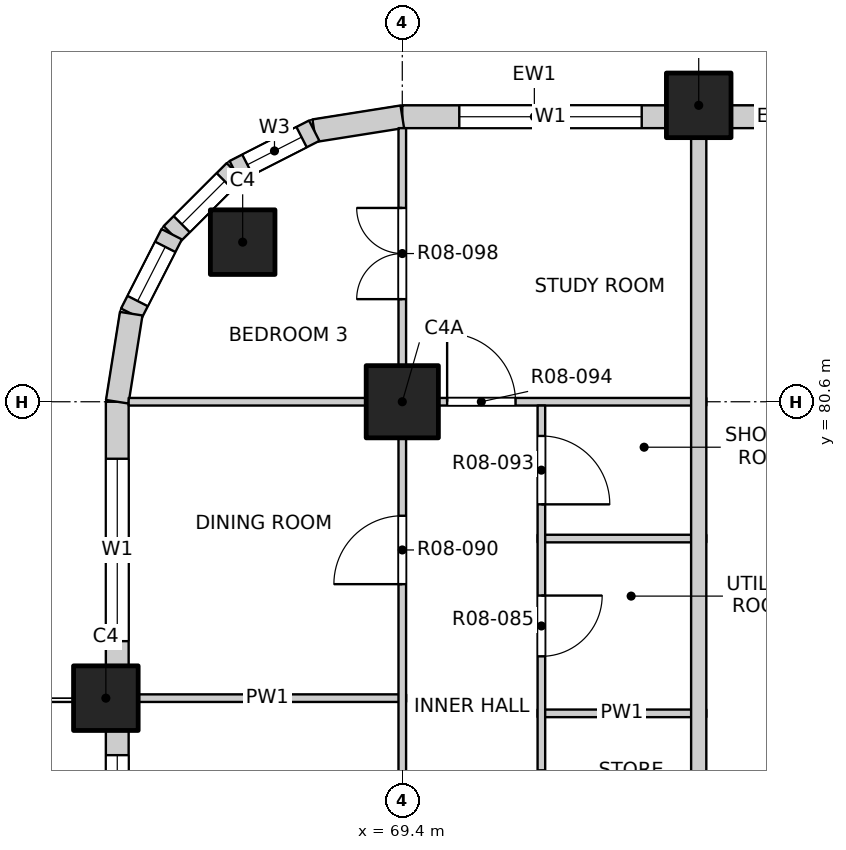
"""IFC4 building model, lengths in metres.
Left out: names, types, materials, properties, quantities, classifications, styles, units other than length and angle.
Written with IfcOpenShell. Run it as: python <this file> out.ifc"""

import sys

from ifc_helpers import new_model, si_unit, direction, frame, frame_2d, origin, origin_2d, place, context, subcontext, project, spatial, rectangle, extrude, element, fill, save


model = new_model("IFC4")
c1 = context("Model", 3, precision=1e-05, world=origin(), true_north=direction((0.0, 1.0)))
c2 = subcontext(c1, "Body", "Model", "MODEL_VIEW")
j1 = project(units=[si_unit("LENGTHUNIT", "METRE"), si_unit("PLANEANGLEUNIT", "RADIAN")], contexts=[c1])
p1 = place(None, origin())
s1 = spatial("IfcSite", under=j1, at=p1, CompositionType="ELEMENT")
p2 = place(p1, origin())
s2 = spatial("IfcBuilding", under=s1, at=p2, CompositionType="ELEMENT")
p3 = place(p2, frame((0.0, 0.0, 103.3)))
s3 = spatial("IfcBuildingStorey", under=s2, at=p3, CompositionType="ELEMENT", Elevation=103.3)
for number, where, z_axis, x_axis in (
    (1, (67.3, 82.7, -0.25), (0.0, 0.0, 1.0), (1.0, 0.0, 0.0)),
    (2, (73.3, 84.5, -0.25), (0.0, 0.0, 1.0), (1.0, 0.0, 0.0)),
    (3, (65.5, 76.7, -0.25), (0.0, 0.0, 1.0), (1.0, 0.0, 0.0)),
):
    element("IfcColumn", number, at=place(p3, frame(where, z_axis=z_axis, x_axis=x_axis)), inside=s3, PredefinedType="COLUMN", context=c2, shape_type="SweptSolid", body=[
        extrude(rectangle(XDim=0.85, YDim=0.85, at=origin_2d()), origin(), (0.0, 0.0, 1.0), 3.4),
    ])
p4 = place(p3, frame((69.4, 80.6, -0.25), z_axis=(0.0, 0.0, 1.0), x_axis=(1.0, 0.0, 0.0)))
e4 = element("IfcColumn", 4, at=p4, inside=s3, PredefinedType="COLUMN", context=c2, shape_type="SweptSolid", body=[
    extrude(rectangle(XDim=0.95, YDim=0.95, at=origin_2d()), origin(), (0.0, 0.0, 1.0), 3.4),
])
p5 = place(p3, frame((69.4, 84.35, 0.0), z_axis=(0.0, 0.0, 1.0), x_axis=(1.0, 0.0, 0.0)))
e5 = element("IfcWall", 5, at=p5, inside=s3, PredefinedType="SOLIDWALL", context=c2, shape_type="SweptSolid", body=[
    extrude(rectangle(XDim=3.475, YDim=0.3, at=frame_2d((1.738, 0.0))), origin(), (0.0, 0.0, 1.0), 2.7),
])
p6 = place(p5, frame((0.75, 0.0, 0.9)))
e6 = element("IfcOpeningElement", 6, at=p6, cuts=e5, PredefinedType="OPENING", context=c2, shape_type="SweptSolid", body=[
    extrude(rectangle(XDim=2.4, YDim=1.8, at=frame_2d((1.2, 0.9))), frame((0.0, 0.16, 0.0), z_axis=(0.0, -1.0, 0.0), x_axis=(1.0, 0.0, 0.0)), (0.0, 0.0, 1.0), 0.32),
])
p7 = place(p3, frame((73.725, 84.35, 0.0), z_axis=(0.0, 0.0, 1.0), x_axis=(1.0, 0.0, 0.0)))
e7 = element("IfcWall", 7, at=p7, inside=s3, PredefinedType="SOLIDWALL", context=c2, shape_type="SweptSolid", body=[
    extrude(rectangle(XDim=1.25, YDim=0.3, at=frame_2d((0.625, 0.0))), origin(), (0.0, 0.0, 1.0), 2.7),
])
p8 = place(p3, frame((65.65, 69.325, 0.0), z_axis=(0.0, 0.0, 1.0), x_axis=(0.0, 1.0, 0.0)))
e8 = element("IfcWall", 8, at=p8, inside=s3, PredefinedType="SOLIDWALL", context=c2, shape_type="SweptSolid", body=[
    extrude(rectangle(XDim=6.95, YDim=0.3, at=frame_2d((3.475, 0.0))), origin(), (0.0, 0.0, 1.0), 2.7),
])
p9 = place(p8, frame((0.625, 0.0, 0.0)))
e9 = element("IfcOpeningElement", 9, at=p9, cuts=e8, PredefinedType="OPENING", context=c2, shape_type="SweptSolid", body=[
    extrude(rectangle(XDim=1.8, YDim=2.4, at=frame_2d((0.9, 1.2))), frame((0.0, 0.16, 0.0), z_axis=(0.0, -1.0, 0.0), x_axis=(1.0, 0.0, 0.0)), (0.0, 0.0, 1.0), 0.32),
])
p10 = place(p8, frame((4.225, 0.0, 0.9)))
e10 = element("IfcOpeningElement", 10, at=p10, cuts=e8, PredefinedType="OPENING", context=c2, shape_type="SweptSolid", body=[
    extrude(rectangle(XDim=2.4, YDim=1.8, at=frame_2d((1.2, 0.9))), frame((0.0, 0.16, 0.0), z_axis=(0.0, -1.0, 0.0), x_axis=(1.0, 0.0, 0.0)), (0.0, 0.0, 1.0), 0.32),
])
p11 = place(p3, frame((65.65, 77.125, 0.0), z_axis=(0.0, 0.0, 1.0), x_axis=(0.0, 1.0, 0.0)))
e11 = element("IfcWall", 11, at=p11, inside=s3, PredefinedType="SOLIDWALL", context=c2, shape_type="SweptSolid", body=[
    extrude(rectangle(XDim=3.475, YDim=0.3, at=frame_2d((1.738, 0.0))), origin(), (0.0, 0.0, 1.0), 2.7),
])
p12 = place(p11, frame((0.325, 0.0, 0.9)))
e12 = element("IfcOpeningElement", 12, at=p12, cuts=e11, PredefinedType="OPENING", context=c2, shape_type="SweptSolid", body=[
    extrude(rectangle(XDim=2.4, YDim=1.8, at=frame_2d((1.2, 0.9))), frame((0.0, 0.16, 0.0), z_axis=(0.0, -1.0, 0.0), x_axis=(1.0, 0.0, 0.0)), (0.0, 0.0, 1.0), 0.32),
])
p13 = place(p3, frame((69.4, 84.35, 0.0), z_axis=(0.0, 0.0, 1.0), x_axis=(-0.987678452879, -0.156496880861, 0.0)))
e13 = element("IfcWall", 13, at=p13, inside=s3, PredefinedType="SOLIDWALL", context=c2, shape_type="SweptSolid", body=[
    extrude(rectangle(XDim=1.173, YDim=0.3, at=frame_2d((0.586, 0.0))), origin(), (0.0, 0.0, 1.0), 2.7),
])
p14 = place(p3, frame((68.241, 84.167, 0.0), z_axis=(0.0, 0.0, 1.0), x_axis=(-0.890988677504, -0.454025524128, 0.0)))
e14 = element("IfcWall", 14, at=p14, inside=s3, PredefinedType="SOLIDWALL", context=c2, shape_type="SweptSolid", body=[
    extrude(rectangle(XDim=1.173, YDim=0.3, at=frame_2d((0.587, 0.0))), origin(), (0.0, 0.0, 1.0), 2.7),
])
p15 = place(p14, frame((0.187, 0.0, 0.9)))
e15 = element("IfcOpeningElement", 15, at=p15, cuts=e14, PredefinedType="OPENING", context=c2, shape_type="SweptSolid", body=[
    extrude(rectangle(XDim=0.8, YDim=1.2, at=frame_2d((0.4, 0.6))), frame((0.0, 0.16, 0.0), z_axis=(0.0, -1.0, 0.0), x_axis=(1.0, 0.0, 0.0)), (0.0, 0.0, 1.0), 0.32),
])
p16 = place(p3, frame((67.196, 83.634, 0.0), z_axis=(0.0, 0.0, 1.0), x_axis=(-0.707106781187, -0.707106781187, 0.0)))
e16 = element("IfcWall", 16, at=p16, inside=s3, PredefinedType="SOLIDWALL", context=c2, shape_type="SweptSolid", body=[
    extrude(rectangle(XDim=1.173, YDim=0.3, at=frame_2d((0.586, 0.0))), origin(), (0.0, 0.0, 1.0), 2.7),
])
p17 = place(p16, frame((0.187, 0.0, 0.9)))
e17 = element("IfcOpeningElement", 17, at=p17, cuts=e16, PredefinedType="OPENING", context=c2, shape_type="SweptSolid", body=[
    extrude(rectangle(XDim=0.8, YDim=1.2, at=frame_2d((0.4, 0.6))), frame((0.0, 0.16, 0.0), z_axis=(0.0, -1.0, 0.0), x_axis=(1.0, 0.0, 0.0)), (0.0, 0.0, 1.0), 0.32),
])
p18 = place(p3, frame((66.366, 82.804, 0.0), z_axis=(0.0, 0.0, 1.0), x_axis=(-0.454025524128, -0.890988677504, 0.0)))
e18 = element("IfcWall", 18, at=p18, inside=s3, PredefinedType="SOLIDWALL", context=c2, shape_type="SweptSolid", body=[
    extrude(rectangle(XDim=1.173, YDim=0.3, at=frame_2d((0.587, 0.0))), origin(), (0.0, 0.0, 1.0), 2.7),
])
p19 = place(p18, frame((0.187, 0.0, 0.9)))
e19 = element("IfcOpeningElement", 19, at=p19, cuts=e18, PredefinedType="OPENING", context=c2, shape_type="SweptSolid", body=[
    extrude(rectangle(XDim=0.8, YDim=1.2, at=frame_2d((0.4, 0.6))), frame((0.0, 0.16, 0.0), z_axis=(0.0, -1.0, 0.0), x_axis=(1.0, 0.0, 0.0)), (0.0, 0.0, 1.0), 0.32),
])
p20 = place(p3, frame((65.833, 81.759, 0.0), z_axis=(0.0, 0.0, 1.0), x_axis=(-0.156496880861, -0.987678452879, 0.0)))
e20 = element("IfcWall", 20, at=p20, inside=s3, PredefinedType="SOLIDWALL", context=c2, shape_type="SweptSolid", body=[
    extrude(rectangle(XDim=1.173, YDim=0.3, at=frame_2d((0.586, 0.0))), origin(), (0.0, 0.0, 1.0), 2.7),
])
p21 = place(p3, frame((71.18, 76.5, 0.0), z_axis=(0.0, 0.0, 1.0), x_axis=(1.0, 0.0, 0.0)))
e21 = element("IfcWall", 21, at=p21, inside=s3, PredefinedType="PARTITIONING", context=c2, shape_type="SweptSolid", body=[
    extrude(rectangle(XDim=2.22, YDim=0.1, at=frame_2d((1.11, 0.0))), origin(), (0.0, 0.0, 1.0), 2.55),
])
p22 = place(p3, frame((65.8, 76.7, 0.0), z_axis=(0.0, 0.0, 1.0), x_axis=(1.0, 0.0, 0.0)))
e22 = element("IfcWall", 22, at=p22, inside=s3, PredefinedType="PARTITIONING", context=c2, shape_type="SweptSolid", body=[
    extrude(rectangle(XDim=3.65, YDim=0.1, at=frame_2d((1.825, 0.0))), origin(), (0.0, 0.0, 1.0), 2.55),
])
p23 = place(p3, frame((71.18, 78.8, 0.0), z_axis=(0.0, 0.0, 1.0), x_axis=(1.0, 0.0, 0.0)))
e23 = element("IfcWall", 23, at=p23, inside=s3, PredefinedType="PARTITIONING", context=c2, shape_type="SweptSolid", body=[
    extrude(rectangle(XDim=2.22, YDim=0.1, at=frame_2d((1.11, 0.0))), origin(), (0.0, 0.0, 1.0), 3.15),
])
p24 = place(p3, frame((65.8, 80.6, 0.0), z_axis=(0.0, 0.0, 1.0), x_axis=(1.0, 0.0, 0.0)))
e24 = element("IfcWall", 24, at=p24, inside=s3, PredefinedType="PARTITIONING", context=c2, shape_type="SweptSolid", body=[
    extrude(rectangle(XDim=7.6, YDim=0.1, at=frame_2d((3.8, 0.0))), origin(), (0.0, 0.0, 1.0), 3.15),
])
p25 = place(p24, frame((4.19, 0.0, 0.0)))
e25 = element("IfcOpeningElement", 25, at=p25, cuts=e24, PredefinedType="OPENING", context=c2, shape_type="SweptSolid", body=[
    extrude(rectangle(XDim=0.9, YDim=2.1, at=frame_2d((0.45, 1.05))), frame((0.0, 0.06, 0.0), z_axis=(0.0, -1.0, 0.0), x_axis=(1.0, 0.0, 0.0)), (0.0, 0.0, 1.0), 0.12),
])
p26 = place(p3, frame((69.4, 45.8, 0.0), z_axis=(0.0, 0.0, 1.0), x_axis=(0.0, 1.0, 0.0)))
e26 = element("IfcWall", 26, at=p26, inside=s3, PredefinedType="PARTITIONING", context=c2, shape_type="SweptSolid", body=[
    extrude(rectangle(XDim=38.4, YDim=0.1, at=frame_2d((19.2, 0.0))), origin(), (0.0, 0.0, 1.0), 3.15),
])
p27 = place(p26, frame((1.05, 0.0, 0.0)))
e27 = element("IfcOpeningElement", 27, at=p27, cuts=e26, PredefinedType="OPENING", context=c2, shape_type="SweptSolid", body=[
    extrude(rectangle(XDim=1.2, YDim=2.1, at=frame_2d((0.6, 1.05))), frame((0.0, 0.06, 0.0), z_axis=(0.0, -1.0, 0.0), x_axis=(1.0, 0.0, 0.0)), (0.0, 0.0, 1.0), 0.12),
])
p28 = place(p26, frame((5.1, 0.0, 0.0)))
e28 = element("IfcOpeningElement", 28, at=p28, cuts=e26, PredefinedType="OPENING", context=c2, shape_type="SweptSolid", body=[
    extrude(rectangle(XDim=0.9, YDim=2.1, at=frame_2d((0.45, 1.05))), frame((0.0, 0.06, 0.0), z_axis=(0.0, -1.0, 0.0), x_axis=(1.0, 0.0, 0.0)), (0.0, 0.0, 1.0), 0.12),
])
p29 = place(p26, frame((9.0, 0.0, 0.0)))
e29 = element("IfcOpeningElement", 29, at=p29, cuts=e26, PredefinedType="OPENING", context=c2, shape_type="SweptSolid", body=[
    extrude(rectangle(XDim=0.9, YDim=2.1, at=frame_2d((0.45, 1.05))), frame((0.0, 0.06, 0.0), z_axis=(0.0, -1.0, 0.0), x_axis=(1.0, 0.0, 0.0)), (0.0, 0.0, 1.0), 0.12),
])
p30 = place(p26, frame((12.9, 0.0, 0.0)))
e30 = element("IfcOpeningElement", 30, at=p30, cuts=e26, PredefinedType="OPENING", context=c2, shape_type="SweptSolid", body=[
    extrude(rectangle(XDim=0.9, YDim=2.1, at=frame_2d((0.45, 1.05))), frame((0.0, 0.06, 0.0), z_axis=(0.0, -1.0, 0.0), x_axis=(1.0, 0.0, 0.0)), (0.0, 0.0, 1.0), 0.12),
])
p31 = place(p26, frame((16.8, 0.0, 0.0)))
e31 = element("IfcOpeningElement", 31, at=p31, cuts=e26, PredefinedType="OPENING", context=c2, shape_type="SweptSolid", body=[
    extrude(rectangle(XDim=0.9, YDim=2.1, at=frame_2d((0.45, 1.05))), frame((0.0, 0.06, 0.0), z_axis=(0.0, -1.0, 0.0), x_axis=(1.0, 0.0, 0.0)), (0.0, 0.0, 1.0), 0.12),
])
p32 = place(p26, frame((20.7, 0.0, 0.0)))
e32 = element("IfcOpeningElement", 32, at=p32, cuts=e26, PredefinedType="OPENING", context=c2, shape_type="SweptSolid", body=[
    extrude(rectangle(XDim=0.9, YDim=2.1, at=frame_2d((0.45, 1.05))), frame((0.0, 0.06, 0.0), z_axis=(0.0, -1.0, 0.0), x_axis=(1.0, 0.0, 0.0)), (0.0, 0.0, 1.0), 0.12),
])
p33 = place(p26, frame((24.6, 0.0, 0.0)))
e33 = element("IfcOpeningElement", 33, at=p33, cuts=e26, PredefinedType="OPENING", context=c2, shape_type="SweptSolid", body=[
    extrude(rectangle(XDim=0.9, YDim=2.1, at=frame_2d((0.45, 1.05))), frame((0.0, 0.06, 0.0), z_axis=(0.0, -1.0, 0.0), x_axis=(1.0, 0.0, 0.0)), (0.0, 0.0, 1.0), 0.12),
])
p34 = place(p26, frame((28.5, 0.0, 0.0)))
e34 = element("IfcOpeningElement", 34, at=p34, cuts=e26, PredefinedType="OPENING", context=c2, shape_type="SweptSolid", body=[
    extrude(rectangle(XDim=0.9, YDim=2.1, at=frame_2d((0.45, 1.05))), frame((0.0, 0.06, 0.0), z_axis=(0.0, -1.0, 0.0), x_axis=(1.0, 0.0, 0.0)), (0.0, 0.0, 1.0), 0.12),
])
p35 = place(p26, frame((32.4, 0.0, 0.0)))
e35 = element("IfcOpeningElement", 35, at=p35, cuts=e26, PredefinedType="OPENING", context=c2, shape_type="SweptSolid", body=[
    extrude(rectangle(XDim=0.9, YDim=2.1, at=frame_2d((0.45, 1.05))), frame((0.0, 0.06, 0.0), z_axis=(0.0, -1.0, 0.0), x_axis=(1.0, 0.0, 0.0)), (0.0, 0.0, 1.0), 0.12),
])
p36 = place(p26, frame((36.15, 0.0, 0.0)))
e36 = element("IfcOpeningElement", 36, at=p36, cuts=e26, PredefinedType="OPENING", context=c2, shape_type="SweptSolid", body=[
    extrude(rectangle(XDim=1.2, YDim=2.1, at=frame_2d((0.6, 1.05))), frame((0.0, 0.06, 0.0), z_axis=(0.0, -1.0, 0.0), x_axis=(1.0, 0.0, 0.0)), (0.0, 0.0, 1.0), 0.12),
])
p37 = place(p3, frame((71.23, 71.8, 0.0), z_axis=(0.0, 0.0, 1.0), x_axis=(0.0, 1.0, 0.0)))
e37 = element("IfcWall", 37, at=p37, inside=s3, PredefinedType="PARTITIONING", context=c2, shape_type="SweptSolid", body=[
    extrude(rectangle(XDim=8.75, YDim=0.1, at=frame_2d((4.375, 0.0))), origin(), (0.0, 0.0, 1.0), 3.15),
])
p38 = place(p37, frame((0.725, 0.0, 0.0)))
e38 = element("IfcOpeningElement", 38, at=p38, cuts=e37, PredefinedType="OPENING", context=c2, shape_type="SweptSolid", body=[
    extrude(rectangle(XDim=0.9, YDim=2.1, at=frame_2d((0.45, 1.05))), frame((0.0, 0.06, 0.0), z_axis=(0.0, -1.0, 0.0), x_axis=(1.0, 0.0, 0.0)), (0.0, 0.0, 1.0), 0.12),
])
p39 = place(p37, frame((3.15, 0.0, 0.0)))
e39 = element("IfcOpeningElement", 39, at=p39, cuts=e37, PredefinedType="OPENING", context=c2, shape_type="SweptSolid", body=[
    extrude(rectangle(XDim=0.8, YDim=2.1, at=frame_2d((0.4, 1.05))), frame((0.0, 0.06, 0.0), z_axis=(0.0, -1.0, 0.0), x_axis=(1.0, 0.0, 0.0)), (0.0, 0.0, 1.0), 0.12),
])
p40 = place(p37, frame((5.45, 0.0, 0.0)))
e40 = element("IfcOpeningElement", 40, at=p40, cuts=e37, PredefinedType="OPENING", context=c2, shape_type="SweptSolid", body=[
    extrude(rectangle(XDim=0.8, YDim=2.1, at=frame_2d((0.4, 1.05))), frame((0.0, 0.06, 0.0), z_axis=(0.0, -1.0, 0.0), x_axis=(1.0, 0.0, 0.0)), (0.0, 0.0, 1.0), 0.12),
])
p41 = place(p37, frame((7.45, 0.0, 0.0)))
e41 = element("IfcOpeningElement", 41, at=p41, cuts=e37, PredefinedType="OPENING", context=c2, shape_type="SweptSolid", body=[
    extrude(rectangle(XDim=0.9, YDim=2.1, at=frame_2d((0.45, 1.05))), frame((0.0, 0.06, 0.0), z_axis=(0.0, -1.0, 0.0), x_axis=(1.0, 0.0, 0.0)), (0.0, 0.0, 1.0), 0.12),
])
p42 = place(p3, frame((73.3, 53.4, 0.0), z_axis=(0.0, 0.0, 1.0), x_axis=(0.0, 1.0, 0.0)))
e42 = element("IfcWall", 42, at=p42, inside=s3, PredefinedType="PARTITIONING", context=c2, shape_type="SweptSolid", body=[
    extrude(rectangle(XDim=30.8, YDim=0.2, at=frame_2d((15.4, 0.0))), origin(), (0.0, 0.0, 1.0), 3.15),
])
p43 = place(p42, frame((6.425, 0.0, 0.0)))
e43 = element("IfcOpeningElement", 43, at=p43, cuts=e42, PredefinedType="OPENING", context=c2, shape_type="SweptSolid", body=[
    extrude(rectangle(XDim=1.0, YDim=2.1, at=frame_2d((0.5, 1.05))), frame((0.0, 0.11, 0.0), z_axis=(0.0, -1.0, 0.0), x_axis=(1.0, 0.0, 0.0)), (0.0, 0.0, 1.0), 0.22),
])
p44 = place(p42, frame((18.525, 0.0, 0.0)))
e44 = element("IfcOpeningElement", 44, at=p44, cuts=e42, PredefinedType="OPENING", context=c2, shape_type="SweptSolid", body=[
    extrude(rectangle(XDim=1.0, YDim=2.1, at=frame_2d((0.5, 1.05))), frame((0.0, 0.11, 0.0), z_axis=(0.0, -1.0, 0.0), x_axis=(1.0, 0.0, 0.0)), (0.0, 0.0, 1.0), 0.22),
])
p45 = place(p6, origin())
e45 = element("IfcWindow", 45, at=p45, inside=s3, PartitioningType="DOUBLE_PANEL_VERTICAL", PredefinedType="WINDOW", context=c2, shape_type="SweptSolid", body=[
    extrude(rectangle(XDim=2.4, YDim=1.8, at=frame_2d((1.2, 0.9))), frame((0.0, 0.03, 0.0), z_axis=(0.0, -1.0, 0.0), x_axis=(1.0, 0.0, 0.0)), (0.0, 0.0, 1.0), 0.06),
])
fill(e6, e45)
p46 = place(p10, origin())
e46 = element("IfcWindow", 46, at=p46, inside=s3, PartitioningType="DOUBLE_PANEL_VERTICAL", PredefinedType="WINDOW", context=c2, shape_type="SweptSolid", body=[
    extrude(rectangle(XDim=2.4, YDim=1.8, at=frame_2d((1.2, 0.9))), frame((0.0, 0.03, 0.0), z_axis=(0.0, -1.0, 0.0), x_axis=(1.0, 0.0, 0.0)), (0.0, 0.0, 1.0), 0.06),
])
fill(e10, e46)
p47 = place(p12, origin())
e47 = element("IfcWindow", 47, at=p47, inside=s3, PartitioningType="DOUBLE_PANEL_VERTICAL", PredefinedType="WINDOW", context=c2, shape_type="SweptSolid", body=[
    extrude(rectangle(XDim=2.4, YDim=1.8, at=frame_2d((1.2, 0.9))), frame((0.0, 0.03, 0.0), z_axis=(0.0, -1.0, 0.0), x_axis=(1.0, 0.0, 0.0)), (0.0, 0.0, 1.0), 0.06),
])
fill(e12, e47)
p48 = place(p15, origin())
e48 = element("IfcWindow", 48, at=p48, inside=s3, PartitioningType="SINGLE_PANEL", PredefinedType="WINDOW", context=c2, shape_type="SweptSolid", body=[
    extrude(rectangle(XDim=0.8, YDim=1.2, at=frame_2d((0.4, 0.6))), frame((0.0, 0.03, 0.0), z_axis=(0.0, -1.0, 0.0), x_axis=(1.0, 0.0, 0.0)), (0.0, 0.0, 1.0), 0.06),
])
fill(e15, e48)
p49 = place(p17, origin())
e49 = element("IfcWindow", 49, at=p49, inside=s3, PartitioningType="SINGLE_PANEL", PredefinedType="WINDOW", context=c2, shape_type="SweptSolid", body=[
    extrude(rectangle(XDim=0.8, YDim=1.2, at=frame_2d((0.4, 0.6))), frame((0.0, 0.03, 0.0), z_axis=(0.0, -1.0, 0.0), x_axis=(1.0, 0.0, 0.0)), (0.0, 0.0, 1.0), 0.06),
])
fill(e17, e49)
p50 = place(p19, origin())
e50 = element("IfcWindow", 50, at=p50, inside=s3, PartitioningType="SINGLE_PANEL", PredefinedType="WINDOW", context=c2, shape_type="SweptSolid", body=[
    extrude(rectangle(XDim=0.8, YDim=1.2, at=frame_2d((0.4, 0.6))), frame((0.0, 0.03, 0.0), z_axis=(0.0, -1.0, 0.0), x_axis=(1.0, 0.0, 0.0)), (0.0, 0.0, 1.0), 0.06),
])
fill(e19, e50)
p51 = place(p40, origin())
e51 = element("IfcDoor", 51, at=p51, inside=s3, OperationType="SINGLE_SWING_LEFT", PredefinedType="DOOR", context=c2, shape_type="SweptSolid", body=[
    extrude(rectangle(XDim=0.8, YDim=2.1, at=frame_2d((0.4, 1.05))), frame((0.0, 0.025, 0.0), z_axis=(0.0, -1.0, 0.0), x_axis=(1.0, 0.0, 0.0)), (0.0, 0.0, 1.0), 0.05),
])
fill(e40, e51)
p52 = place(p35, origin())
e52 = element("IfcDoor", 52, at=p52, inside=s3, OperationType="SINGLE_SWING_LEFT", PredefinedType="DOOR", context=c2, shape_type="SweptSolid", body=[
    extrude(rectangle(XDim=0.9, YDim=2.1, at=frame_2d((0.45, 1.05))), frame((0.0, 0.025, 0.0), z_axis=(0.0, -1.0, 0.0), x_axis=(1.0, 0.0, 0.0)), (0.0, 0.0, 1.0), 0.05),
])
fill(e35, e52)
p53 = place(p41, origin())
e53 = element("IfcDoor", 53, at=p53, inside=s3, OperationType="SINGLE_SWING_RIGHT", PredefinedType="DOOR", context=c2, shape_type="SweptSolid", body=[
    extrude(rectangle(XDim=0.9, YDim=2.1, at=frame_2d((0.45, 1.05))), frame((0.0, 0.025, 0.0), z_axis=(0.0, -1.0, 0.0), x_axis=(1.0, 0.0, 0.0)), (0.0, 0.0, 1.0), 0.05),
])
fill(e41, e53)
p54 = place(p25, origin())
e54 = element("IfcDoor", 54, at=p54, inside=s3, OperationType="SINGLE_SWING_LEFT", PredefinedType="DOOR", context=c2, shape_type="SweptSolid", body=[
    extrude(rectangle(XDim=0.9, YDim=2.1, at=frame_2d((0.45, 1.05))), frame((0.0, 0.025, 0.0), z_axis=(0.0, -1.0, 0.0), x_axis=(1.0, 0.0, 0.0)), (0.0, 0.0, 1.0), 0.05),
])
fill(e25, e54)
p55 = place(p36, origin())
e55 = element("IfcDoor", 55, at=p55, inside=s3, OperationType="DOUBLE_DOOR_SINGLE_SWING", PredefinedType="DOOR", context=c2, shape_type="SweptSolid", body=[
    extrude(rectangle(XDim=1.2, YDim=2.1, at=frame_2d((0.6, 1.05))), frame((0.0, 0.025, 0.0), z_axis=(0.0, -1.0, 0.0), x_axis=(1.0, 0.0, 0.0)), (0.0, 0.0, 1.0), 0.05),
])
fill(e36, e55)
save(model, sys.argv[1])
